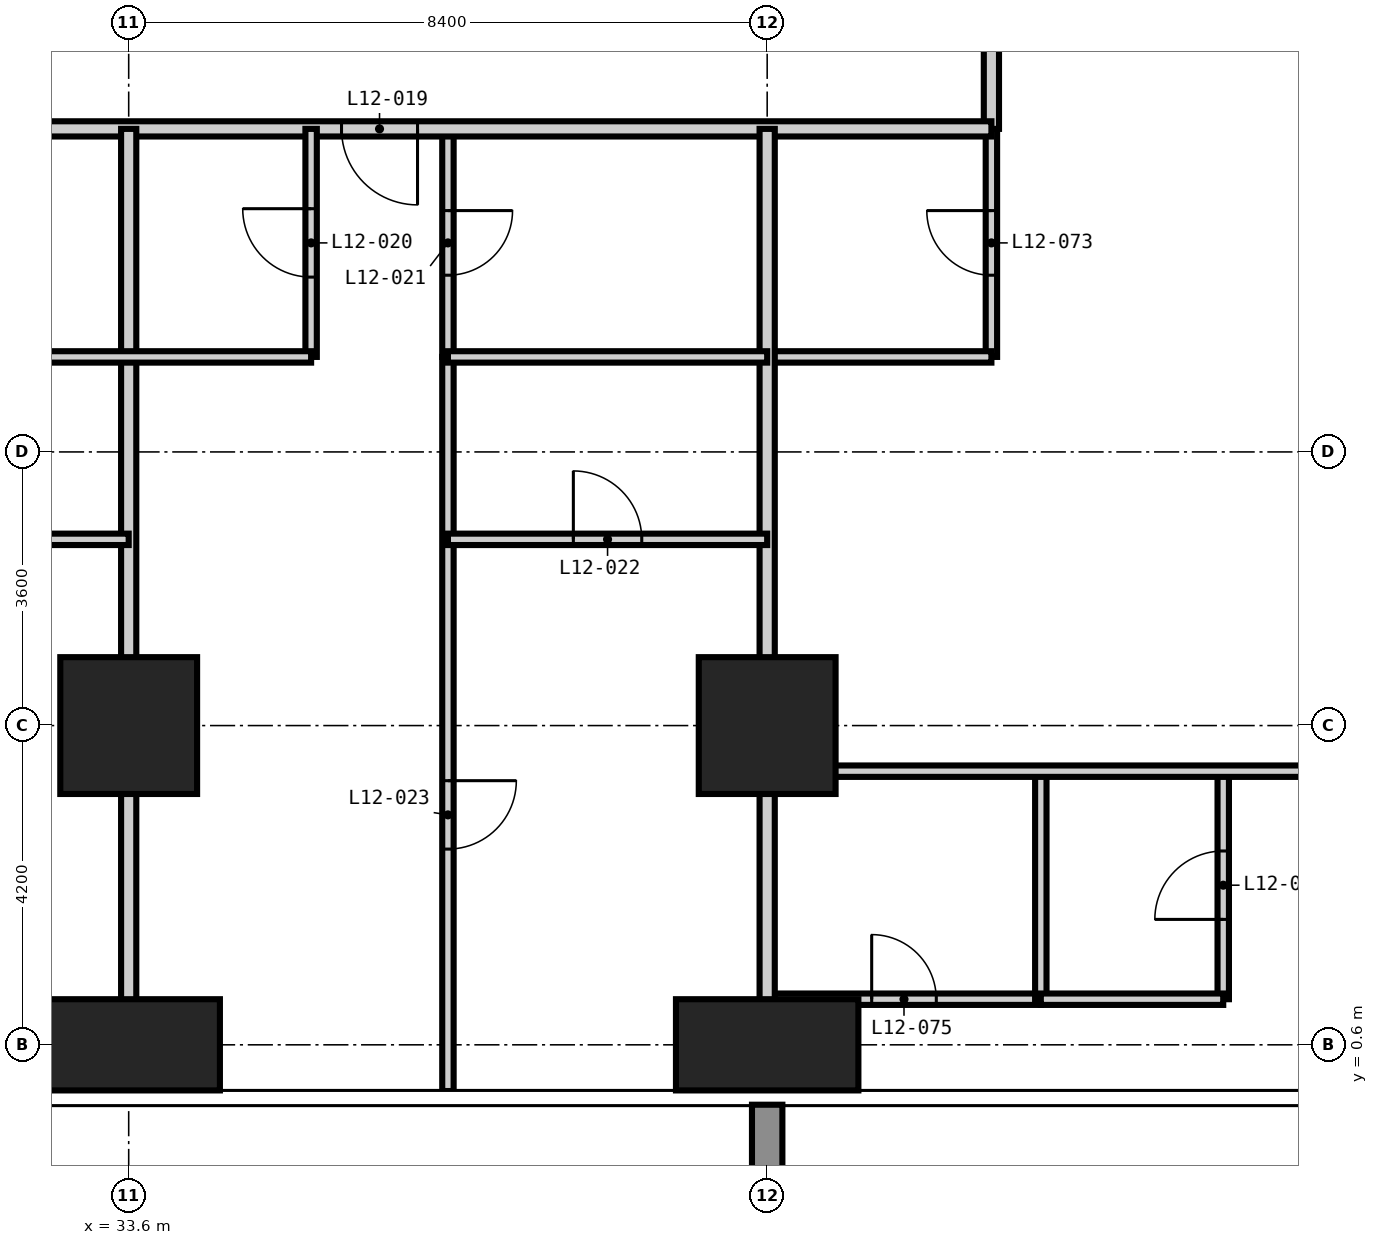
"""IFC4 building model, lengths in metres.
Left out: names, types, materials, properties, quantities, classifications, styles, units other than length and angle.
Written with IfcOpenShell. Run it as: python <this file> out.ifc"""

import sys

from ifc_helpers import new_model, si_unit, direction, frame, frame_2d, origin, origin_2d, place, context, subcontext, project, spatial, rectangle, extrude, element, fill, save


model = new_model("IFC4")
c1 = context("Model", 3, precision=1e-05, world=origin(), true_north=direction((0.0, 1.0)))
c2 = subcontext(c1, "Body", "Model", "MODEL_VIEW")
j1 = project(units=[si_unit("LENGTHUNIT", "METRE"), si_unit("PLANEANGLEUNIT", "RADIAN")], contexts=[c1])
p1 = place(None, origin())
s1 = spatial("IfcSite", under=j1, at=p1, CompositionType="ELEMENT")
p2 = place(p1, origin())
s2 = spatial("IfcBuilding", under=s1, at=p2, CompositionType="ELEMENT")
p3 = place(p2, frame((0.0, 0.0, 52.2)))
s3 = spatial("IfcBuildingStorey", under=s2, at=p3, CompositionType="ELEMENT", Elevation=52.2)
p4 = place(p3, frame((33.6, 0.6, -0.35), z_axis=(0.0, 0.0, 1.0), x_axis=(1.0, 0.0, 0.0)))
e1 = element("IfcColumn", 1, at=p4, inside=s3, PredefinedType="COLUMN", context=c2, shape_type="SweptSolid", body=[
    extrude(rectangle(XDim=2.4, YDim=1.2, at=origin_2d()), origin(), (0.0, 0.0, 1.0), 3.6),
])
p5 = place(p3, frame((33.6, 4.8, -0.35), z_axis=(0.0, 0.0, 1.0), x_axis=(1.0, 0.0, 0.0)))
e2 = element("IfcColumn", 2, at=p5, inside=s3, PredefinedType="COLUMN", context=c2, shape_type="SweptSolid", body=[
    extrude(rectangle(XDim=1.8, YDim=1.8, at=origin_2d()), origin(), (0.0, 0.0, 1.0), 3.6),
])
p6 = place(p3, frame((42.0, 0.6, -0.35), z_axis=(0.0, 0.0, 1.0), x_axis=(1.0, 0.0, 0.0)))
e3 = element("IfcColumn", 3, at=p6, inside=s3, PredefinedType="COLUMN", context=c2, shape_type="SweptSolid", body=[
    extrude(rectangle(XDim=2.4, YDim=1.2, at=origin_2d()), origin(), (0.0, 0.0, 1.0), 3.6),
])
p7 = place(p3, frame((42.0, 4.8, -0.35), z_axis=(0.0, 0.0, 1.0), x_axis=(1.0, 0.0, 0.0)))
e4 = element("IfcColumn", 4, at=p7, inside=s3, PredefinedType="COLUMN", context=c2, shape_type="SweptSolid", body=[
    extrude(rectangle(XDim=1.8, YDim=1.8, at=origin_2d()), origin(), (0.0, 0.0, 1.0), 3.6),
])
p8 = place(p3, frame((37.8, 9.65, 0.0), z_axis=(0.0, 0.0, 1.0), x_axis=(0.0, 1.0, 0.0)))
e5 = element("IfcWall", 5, at=p8, inside=s3, PredefinedType="PARTITIONING", context=c2, shape_type="SweptSolid", body=[
    extrude(rectangle(XDim=3.0, YDim=0.15, at=frame_2d((1.5, 0.0))), origin(), (0.0, 0.0, 1.0), 3.25),
])
p9 = place(p8, frame((1.075, 0.0, 0.0)))
e6 = element("IfcOpeningElement", 6, at=p9, cuts=e5, PredefinedType="OPENING", context=c2, shape_type="SweptSolid", body=[
    extrude(rectangle(XDim=0.85, YDim=2.1, at=frame_2d((0.425, 1.05))), frame((0.0, 0.085, 0.0), z_axis=(0.0, -1.0, 0.0), x_axis=(1.0, 0.0, 0.0)), (0.0, 0.0, 1.0), 0.17),
])
p10 = place(p3, frame((44.95, 9.65, 0.0), z_axis=(0.0, 0.0, 1.0), x_axis=(0.0, 1.0, 0.0)))
e7 = element("IfcWall", 7, at=p10, inside=s3, PredefinedType="PARTITIONING", context=c2, shape_type="SweptSolid", body=[
    extrude(rectangle(XDim=3.0, YDim=0.15, at=frame_2d((1.5, 0.0))), origin(), (0.0, 0.0, 1.0), 3.25),
])
p11 = place(p10, frame((1.075, 0.0, 0.0)))
e8 = element("IfcOpeningElement", 8, at=p11, cuts=e7, PredefinedType="OPENING", context=c2, shape_type="SweptSolid", body=[
    extrude(rectangle(XDim=0.85, YDim=2.1, at=frame_2d((0.425, 1.05))), frame((0.0, 0.085, 0.0), z_axis=(0.0, -1.0, 0.0), x_axis=(1.0, 0.0, 0.0)), (0.0, 0.0, 1.0), 0.17),
])
p12 = place(p3, frame((42.0, 1.2, 0.0), z_axis=(0.0, 0.0, 1.0), x_axis=(1.0, 0.0, 0.0)))
e9 = element("IfcWall", 9, at=p12, inside=s3, PredefinedType="PARTITIONING", context=c2, shape_type="SweptSolid", body=[
    extrude(rectangle(XDim=3.6, YDim=0.15, at=frame_2d((1.8, 0.0))), origin(), (0.0, 0.0, 1.0), 3.25),
])
p13 = place(p12, frame((1.375, 0.0, 0.0)))
e10 = element("IfcOpeningElement", 10, at=p13, cuts=e9, PredefinedType="OPENING", context=c2, shape_type="SweptSolid", body=[
    extrude(rectangle(XDim=0.85, YDim=2.1, at=frame_2d((0.425, 1.05))), frame((0.0, 0.085, 0.0), z_axis=(0.0, -1.0, 0.0), x_axis=(1.0, 0.0, 0.0)), (0.0, 0.0, 1.0), 0.17),
])
p14 = place(p3, frame((42.0, 9.65, 0.0), z_axis=(0.0, 0.0, 1.0), x_axis=(1.0, 0.0, 0.0)))
e11 = element("IfcWall", 11, at=p14, inside=s3, PredefinedType="PARTITIONING", context=c2, shape_type="SweptSolid", body=[
    extrude(rectangle(XDim=2.95, YDim=0.15, at=frame_2d((1.475, 0.0))), origin(), (0.0, 0.0, 1.0), 3.25),
])
p15 = place(p3, frame((44.95, 45.55, 0.0), z_axis=(0.0, 0.0, 1.0), x_axis=(0.0, -1.0, 0.0)))
e12 = element("IfcWall", 12, at=p15, inside=s3, PredefinedType="PARTITIONING", context=c2, shape_type="SweptSolid", body=[
    extrude(rectangle(XDim=32.9, YDim=0.2, at=frame_2d((16.45, 0.0))), origin(), (0.0, 0.0, 1.0), 3.25),
])
p16 = place(p15, frame((24.8, 0.0, 0.0)))
e13 = element("IfcOpeningElement", 13, at=p16, cuts=e12, PredefinedType="OPENING", context=c2, shape_type="SweptSolid", body=[
    extrude(rectangle(XDim=1.0, YDim=2.2, at=frame_2d((0.5, 1.1))), frame((0.0, 0.11, 0.0), z_axis=(0.0, -1.0, 0.0), x_axis=(1.0, 0.0, 0.0)), (0.0, 0.0, 1.0), 0.22),
])
p17 = place(p15, frame((19.85, 0.0, 0.0)))
e14 = element("IfcOpeningElement", 14, at=p17, cuts=e12, PredefinedType="OPENING", context=c2, shape_type="SweptSolid", body=[
    extrude(rectangle(XDim=1.0, YDim=2.2, at=frame_2d((0.5, 1.1))), frame((0.0, 0.11, 0.0), z_axis=(0.0, -1.0, 0.0), x_axis=(1.0, 0.0, 0.0)), (0.0, 0.0, 1.0), 0.22),
])
p18 = place(p15, frame((11.45, 0.0, 0.0)))
e15 = element("IfcOpeningElement", 15, at=p18, cuts=e12, PredefinedType="OPENING", context=c2, shape_type="SweptSolid", body=[
    extrude(rectangle(XDim=1.0, YDim=2.2, at=frame_2d((0.5, 1.1))), frame((0.0, 0.11, 0.0), z_axis=(0.0, -1.0, 0.0), x_axis=(1.0, 0.0, 0.0)), (0.0, 0.0, 1.0), 0.22),
])
p19 = place(p15, frame((6.5, 0.0, 0.0)))
e16 = element("IfcOpeningElement", 16, at=p19, cuts=e12, PredefinedType="OPENING", context=c2, shape_type="SweptSolid", body=[
    extrude(rectangle(XDim=1.0, YDim=2.2, at=frame_2d((0.5, 1.1))), frame((0.0, 0.11, 0.0), z_axis=(0.0, -1.0, 0.0), x_axis=(1.0, 0.0, 0.0)), (0.0, 0.0, 1.0), 0.22),
])
p20 = place(p15, frame((30.325, 0.0, 0.0)))
e17 = element("IfcOpeningElement", 17, at=p20, cuts=e12, PredefinedType="OPENING", context=c2, shape_type="SweptSolid", body=[
    extrude(rectangle(XDim=1.0, YDim=2.2, at=frame_2d((0.5, 1.1))), frame((0.0, 0.11, 0.0), z_axis=(0.0, -1.0, 0.0), x_axis=(1.0, 0.0, 0.0)), (0.0, 0.0, 1.0), 0.22),
])
p21 = place(p15, frame((1.275, 0.0, 0.0)))
e18 = element("IfcOpeningElement", 18, at=p21, cuts=e12, PredefinedType="OPENING", context=c2, shape_type="SweptSolid", body=[
    extrude(rectangle(XDim=1.0, YDim=2.2, at=frame_2d((0.5, 1.1))), frame((0.0, 0.11, 0.0), z_axis=(0.0, -1.0, 0.0), x_axis=(1.0, 0.0, 0.0)), (0.0, 0.0, 1.0), 0.22),
])
p22 = place(p3, frame((44.95, 12.65, 0.0), z_axis=(0.0, 0.0, 1.0), x_axis=(-1.0, 0.0, 0.0)))
e19 = element("IfcWall", 19, at=p22, inside=s3, PredefinedType="PARTITIONING", context=c2, shape_type="SweptSolid", body=[
    extrude(rectangle(XDim=32.3, YDim=0.2, at=frame_2d((16.15, 0.0))), origin(), (0.0, 0.0, 1.0), 3.25),
])
p23 = place(p22, frame((24.35, 0.0, 0.0)))
e20 = element("IfcOpeningElement", 20, at=p23, cuts=e19, PredefinedType="OPENING", context=c2, shape_type="SweptSolid", body=[
    extrude(rectangle(XDim=1.0, YDim=2.2, at=frame_2d((0.5, 1.1))), frame((0.0, 0.11, 0.0), z_axis=(0.0, -1.0, 0.0), x_axis=(1.0, 0.0, 0.0)), (0.0, 0.0, 1.0), 0.22),
])
p24 = place(p22, frame((15.95, 0.0, 0.0)))
e21 = element("IfcOpeningElement", 21, at=p24, cuts=e19, PredefinedType="OPENING", context=c2, shape_type="SweptSolid", body=[
    extrude(rectangle(XDim=1.0, YDim=2.2, at=frame_2d((0.5, 1.1))), frame((0.0, 0.11, 0.0), z_axis=(0.0, -1.0, 0.0), x_axis=(1.0, 0.0, 0.0)), (0.0, 0.0, 1.0), 0.22),
])
p25 = place(p22, frame((7.55, 0.0, 0.0)))
e22 = element("IfcOpeningElement", 22, at=p25, cuts=e19, PredefinedType="OPENING", context=c2, shape_type="SweptSolid", body=[
    extrude(rectangle(XDim=1.0, YDim=2.2, at=frame_2d((0.5, 1.1))), frame((0.0, 0.11, 0.0), z_axis=(0.0, -1.0, 0.0), x_axis=(1.0, 0.0, 0.0)), (0.0, 0.0, 1.0), 0.22),
])
for number, where, z_axis, x_axis in (
    (23, (33.6, -0.008, 0.0), (0.0, 0.0, 1.0), (0.0, 1.0, 0.0)),
    (24, (42.0, -0.008, 0.0), (0.0, 0.0, 1.0), (0.0, 1.0, 0.0)),
):
    element("IfcWall", number, at=place(p3, frame(where, z_axis=z_axis, x_axis=x_axis)), inside=s3, PredefinedType="PARTITIONING", context=c2, shape_type="SweptSolid", body=[
        extrude(rectangle(XDim=12.658, YDim=0.2, at=frame_2d((6.329, 0.0))), origin(), (0.0, 0.0, 1.0), 3.25),
    ])
p26 = place(p3, frame((36.0, 9.65, 0.0), z_axis=(0.0, 0.0, 1.0), x_axis=(0.0, 1.0, 0.0)))
e25 = element("IfcWall", 25, at=p26, inside=s3, PredefinedType="PARTITIONING", context=c2, shape_type="SweptSolid", body=[
    extrude(rectangle(XDim=3.0, YDim=0.15, at=frame_2d((1.5, 0.0))), origin(), (0.0, 0.0, 1.0), 3.25),
])
p27 = place(p26, frame((1.05, 0.0, 0.0)))
e26 = element("IfcOpeningElement", 26, at=p27, cuts=e25, PredefinedType="OPENING", context=c2, shape_type="SweptSolid", body=[
    extrude(rectangle(XDim=0.9, YDim=2.1, at=frame_2d((0.45, 1.05))), frame((0.0, 0.085, 0.0), z_axis=(0.0, -1.0, 0.0), x_axis=(1.0, 0.0, 0.0)), (0.0, 0.0, 1.0), 0.17),
])
p28 = place(p3, frame((37.8, -0.008, 0.0), z_axis=(0.0, 0.0, 1.0), x_axis=(0.0, 1.0, 0.0)))
e27 = element("IfcWall", 27, at=p28, inside=s3, PredefinedType="PARTITIONING", context=c2, shape_type="SweptSolid", body=[
    extrude(rectangle(XDim=9.658, YDim=0.15, at=frame_2d((4.829, 0.0))), origin(), (0.0, 0.0, 1.0), 3.25),
])
p29 = place(p28, frame((3.183, 0.0, 0.0)))
e28 = element("IfcOpeningElement", 28, at=p29, cuts=e27, PredefinedType="OPENING", context=c2, shape_type="SweptSolid", body=[
    extrude(rectangle(XDim=0.9, YDim=2.1, at=frame_2d((0.45, 1.05))), frame((0.0, 0.085, 0.0), z_axis=(0.0, -1.0, 0.0), x_axis=(1.0, 0.0, 0.0)), (0.0, 0.0, 1.0), 0.17),
])
p30 = place(p3, frame((45.6, 1.2, 0.0), z_axis=(0.0, 0.0, 1.0), x_axis=(0.0, 1.0, 0.0)))
e29 = element("IfcWall", 29, at=p30, inside=s3, PredefinedType="PARTITIONING", context=c2, shape_type="SweptSolid", body=[
    extrude(rectangle(XDim=3.0, YDim=0.15, at=frame_2d((1.5, 0.0))), origin(), (0.0, 0.0, 1.0), 3.25),
])
p31 = place(p3, frame((48.0, 1.2, 0.0), z_axis=(0.0, 0.0, 1.0), x_axis=(0.0, 1.0, 0.0)))
e30 = element("IfcWall", 30, at=p31, inside=s3, PredefinedType="PARTITIONING", context=c2, shape_type="SweptSolid", body=[
    extrude(rectangle(XDim=3.0, YDim=0.15, at=frame_2d((1.5, 0.0))), origin(), (0.0, 0.0, 1.0), 3.25),
])
p32 = place(p31, frame((1.05, 0.0, 0.0)))
e31 = element("IfcOpeningElement", 31, at=p32, cuts=e30, PredefinedType="OPENING", context=c2, shape_type="SweptSolid", body=[
    extrude(rectangle(XDim=0.9, YDim=2.1, at=frame_2d((0.45, 1.05))), frame((0.0, 0.085, 0.0), z_axis=(0.0, -1.0, 0.0), x_axis=(1.0, 0.0, 0.0)), (0.0, 0.0, 1.0), 0.17),
])
p33 = place(p3, frame((45.6, 1.2, 0.0), z_axis=(0.0, 0.0, 1.0), x_axis=(1.0, 0.0, 0.0)))
e32 = element("IfcWall", 32, at=p33, inside=s3, PredefinedType="PARTITIONING", context=c2, shape_type="SweptSolid", body=[
    extrude(rectangle(XDim=2.4, YDim=0.15, at=frame_2d((1.2, 0.0))), origin(), (0.0, 0.0, 1.0), 3.25),
])
p34 = place(p3, frame((42.0, 4.2, 0.0), z_axis=(0.0, 0.0, 1.0), x_axis=(1.0, 0.0, 0.0)))
e33 = element("IfcWall", 33, at=p34, inside=s3, PredefinedType="PARTITIONING", context=c2, shape_type="SweptSolid", body=[
    extrude(rectangle(XDim=16.808, YDim=0.15, at=frame_2d((8.404, 0.0))), origin(), (0.0, 0.0, 1.0), 3.25),
])
p35 = place(p34, frame((10.95, 0.0, 0.0)))
e34 = element("IfcOpeningElement", 34, at=p35, cuts=e33, PredefinedType="OPENING", context=c2, shape_type="SweptSolid", body=[
    extrude(rectangle(XDim=0.9, YDim=2.1, at=frame_2d((0.45, 1.05))), frame((0.0, 0.085, 0.0), z_axis=(0.0, -1.0, 0.0), x_axis=(1.0, 0.0, 0.0)), (0.0, 0.0, 1.0), 0.17),
])
p36 = place(p3, frame((29.4, 7.25, 0.0), z_axis=(0.0, 0.0, 1.0), x_axis=(1.0, 0.0, 0.0)))
e35 = element("IfcWall", 35, at=p36, inside=s3, PredefinedType="PARTITIONING", context=c2, shape_type="SweptSolid", body=[
    extrude(rectangle(XDim=4.2, YDim=0.15, at=frame_2d((2.1, 0.0))), origin(), (0.0, 0.0, 1.0), 3.25),
])
p37 = place(p36, frame((1.65, 0.0, 0.0)))
e36 = element("IfcOpeningElement", 36, at=p37, cuts=e35, PredefinedType="OPENING", context=c2, shape_type="SweptSolid", body=[
    extrude(rectangle(XDim=0.9, YDim=2.1, at=frame_2d((0.45, 1.05))), frame((0.0, 0.085, 0.0), z_axis=(0.0, -1.0, 0.0), x_axis=(1.0, 0.0, 0.0)), (0.0, 0.0, 1.0), 0.17),
])
p38 = place(p3, frame((37.8, 7.25, 0.0), z_axis=(0.0, 0.0, 1.0), x_axis=(1.0, 0.0, 0.0)))
e37 = element("IfcWall", 37, at=p38, inside=s3, PredefinedType="PARTITIONING", context=c2, shape_type="SweptSolid", body=[
    extrude(rectangle(XDim=4.2, YDim=0.15, at=frame_2d((2.1, 0.0))), origin(), (0.0, 0.0, 1.0), 3.25),
])
p39 = place(p38, frame((1.65, 0.0, 0.0)))
e38 = element("IfcOpeningElement", 38, at=p39, cuts=e37, PredefinedType="OPENING", context=c2, shape_type="SweptSolid", body=[
    extrude(rectangle(XDim=0.9, YDim=2.1, at=frame_2d((0.45, 1.05))), frame((0.0, 0.085, 0.0), z_axis=(0.0, -1.0, 0.0), x_axis=(1.0, 0.0, 0.0)), (0.0, 0.0, 1.0), 0.17),
])
p40 = place(p3, frame((29.4, 9.65, 0.0), z_axis=(0.0, 0.0, 1.0), x_axis=(1.0, 0.0, 0.0)))
e39 = element("IfcWall", 39, at=p40, inside=s3, PredefinedType="PARTITIONING", context=c2, shape_type="SweptSolid", body=[
    extrude(rectangle(XDim=6.6, YDim=0.15, at=frame_2d((3.3, 0.0))), origin(), (0.0, 0.0, 1.0), 3.25),
])
p41 = place(p3, frame((37.8, 9.65, 0.0), z_axis=(0.0, 0.0, 1.0), x_axis=(1.0, 0.0, 0.0)))
e40 = element("IfcWall", 40, at=p41, inside=s3, PredefinedType="PARTITIONING", context=c2, shape_type="SweptSolid", body=[
    extrude(rectangle(XDim=4.2, YDim=0.15, at=frame_2d((2.1, 0.0))), origin(), (0.0, 0.0, 1.0), 3.25),
])
p42 = place(p25, origin())
e41 = element("IfcDoor", 41, at=p42, inside=s3, OperationType="SINGLE_SWING_LEFT", PredefinedType="DOOR", context=c2, shape_type="SweptSolid", body=[
    extrude(rectangle(XDim=1.0, YDim=2.2, at=frame_2d((0.5, 1.1))), frame((0.0, 0.025, 0.0), z_axis=(0.0, -1.0, 0.0), x_axis=(1.0, 0.0, 0.0)), (0.0, 0.0, 1.0), 0.05),
])
fill(e22, e41)
p43 = place(p27, origin())
e42 = element("IfcDoor", 42, at=p43, inside=s3, OperationType="SINGLE_SWING_RIGHT", PredefinedType="DOOR", context=c2, shape_type="SweptSolid", body=[
    extrude(rectangle(XDim=0.9, YDim=2.1, at=frame_2d((0.45, 1.05))), frame((0.0, 0.025, 0.0), z_axis=(0.0, -1.0, 0.0), x_axis=(1.0, 0.0, 0.0)), (0.0, 0.0, 1.0), 0.05),
])
fill(e26, e42)
p44 = place(p9, frame((0.85, 0.0, 0.0), z_axis=(0.0, 0.0, 1.0), x_axis=(-1.0, 0.0, 0.0)))
e43 = element("IfcDoor", 43, at=p44, inside=s3, OperationType="SINGLE_SWING_LEFT", PredefinedType="DOOR", context=c2, shape_type="SweptSolid", body=[
    extrude(rectangle(XDim=0.85, YDim=2.1, at=frame_2d((0.425, 1.05))), frame((0.0, 0.025, 0.0), z_axis=(0.0, -1.0, 0.0), x_axis=(1.0, 0.0, 0.0)), (0.0, 0.0, 1.0), 0.05),
])
fill(e6, e43)
p45 = place(p39, origin())
e44 = element("IfcDoor", 44, at=p45, inside=s3, OperationType="SINGLE_SWING_LEFT", PredefinedType="DOOR", context=c2, shape_type="SweptSolid", body=[
    extrude(rectangle(XDim=0.9, YDim=2.1, at=frame_2d((0.45, 1.05))), frame((0.0, 0.025, 0.0), z_axis=(0.0, -1.0, 0.0), x_axis=(1.0, 0.0, 0.0)), (0.0, 0.0, 1.0), 0.05),
])
fill(e38, e44)
p46 = place(p29, frame((0.9, 0.0, 0.0), z_axis=(0.0, 0.0, 1.0), x_axis=(-1.0, 0.0, 0.0)))
e45 = element("IfcDoor", 45, at=p46, inside=s3, OperationType="SINGLE_SWING_LEFT", PredefinedType="DOOR", context=c2, shape_type="SweptSolid", body=[
    extrude(rectangle(XDim=0.9, YDim=2.1, at=frame_2d((0.45, 1.05))), frame((0.0, 0.025, 0.0), z_axis=(0.0, -1.0, 0.0), x_axis=(1.0, 0.0, 0.0)), (0.0, 0.0, 1.0), 0.05),
])
fill(e28, e45)
p47 = place(p11, origin())
e46 = element("IfcDoor", 46, at=p47, inside=s3, OperationType="SINGLE_SWING_RIGHT", PredefinedType="DOOR", context=c2, shape_type="SweptSolid", body=[
    extrude(rectangle(XDim=0.85, YDim=2.1, at=frame_2d((0.425, 1.05))), frame((0.0, 0.025, 0.0), z_axis=(0.0, -1.0, 0.0), x_axis=(1.0, 0.0, 0.0)), (0.0, 0.0, 1.0), 0.05),
])
fill(e8, e46)
p48 = place(p13, origin())
e47 = element("IfcDoor", 47, at=p48, inside=s3, OperationType="SINGLE_SWING_LEFT", PredefinedType="DOOR", context=c2, shape_type="SweptSolid", body=[
    extrude(rectangle(XDim=0.85, YDim=2.1, at=frame_2d((0.425, 1.05))), frame((0.0, 0.025, 0.0), z_axis=(0.0, -1.0, 0.0), x_axis=(1.0, 0.0, 0.0)), (0.0, 0.0, 1.0), 0.05),
])
fill(e10, e47)
p49 = place(p32, origin())
e48 = element("IfcDoor", 48, at=p49, inside=s3, OperationType="SINGLE_SWING_LEFT", PredefinedType="DOOR", context=c2, shape_type="SweptSolid", body=[
    extrude(rectangle(XDim=0.9, YDim=2.1, at=frame_2d((0.45, 1.05))), frame((0.0, 0.025, 0.0), z_axis=(0.0, -1.0, 0.0), x_axis=(1.0, 0.0, 0.0)), (0.0, 0.0, 1.0), 0.05),
])
fill(e31, e48)
save(model, sys.argv[1])
